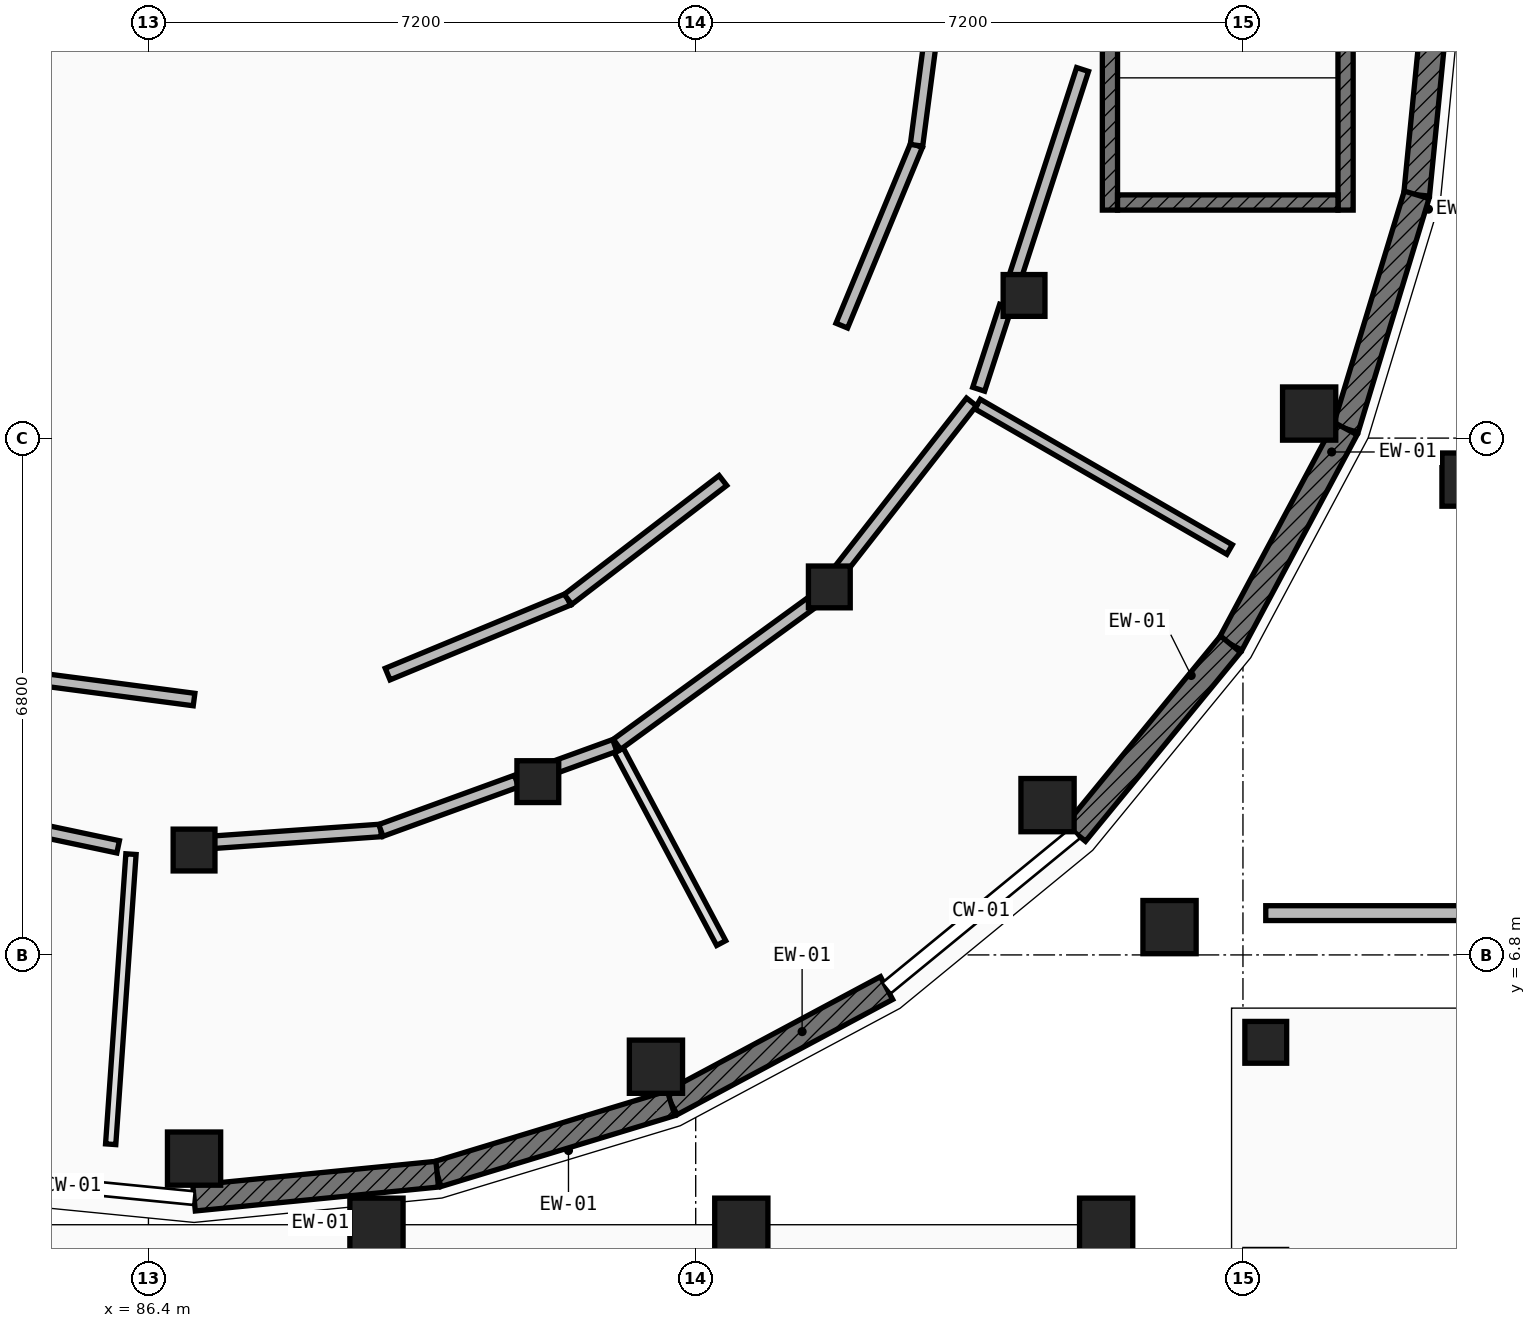
"""IFC4 building model, lengths in metres.
Left out: names, types, materials, properties, quantities, classifications, styles, units other than length and angle.
Written with IfcOpenShell. Run it as: python <this file> out.ifc"""

import sys

from ifc_helpers import new_model, si_unit, direction, frame, frame_2d, origin, origin_2d, place, context, subcontext, project, spatial, rectangle, circle, extrude, element, fill, save


model = new_model("IFC4")
c1 = context("Model", 3, precision=1e-05, world=origin(), true_north=direction((0.0, 1.0)))
c2 = subcontext(c1, "Body", "Model", "MODEL_VIEW")
j1 = project(units=[si_unit("LENGTHUNIT", "METRE"), si_unit("PLANEANGLEUNIT", "RADIAN")], contexts=[c1])
p1 = place(None, origin())
s1 = spatial("IfcSite", under=j1, at=p1, CompositionType="ELEMENT")
p2 = place(p1, origin())
s2 = spatial("IfcBuilding", under=s1, at=p2, CompositionType="ELEMENT")
p3 = place(p2, origin())
s3 = spatial("IfcBuildingStorey", under=s2, at=p3, CompositionType="ELEMENT", Elevation=0.0)
for number, where, z_axis, x_axis in (
    (1, (87.0, 4.12, 0.0), (0.0, 0.0, 1.0), (1.0, 0.0, 0.0)),
    (2, (93.077, 5.329, 0.0), (0.0, 0.0, 1.0), (1.0, 0.0, 0.0)),
    (3, (98.229, 8.771, 0.0), (0.0, 0.0, 1.0), (1.0, 0.0, 0.0)),
    (4, (101.671, 13.923, 0.0), (0.0, 0.0, 1.0), (1.0, 0.0, 0.0)),
):
    element("IfcColumn", number, at=place(p3, frame(where, z_axis=z_axis, x_axis=x_axis)), inside=s3, PredefinedType="COLUMN", context=c2, shape_type="SweptSolid", body=[
        extrude(circle(Radius=0.35, at=origin_2d()), origin(), (0.0, 0.0, 1.0), 4.55),
    ])
for number, where, z_axis, x_axis in (
    (5, (87.0, 8.18, 0.0), (0.0, 0.0, 1.0), (1.0, 0.0, 0.0)),
    (6, (91.523, 9.08, 0.0), (0.0, 0.0, 1.0), (1.0, 0.0, 0.0)),
    (7, (95.358, 11.642, 0.0), (0.0, 0.0, 1.0), (1.0, 0.0, 0.0)),
    (8, (97.92, 15.477, 0.0), (0.0, 0.0, 1.0), (1.0, 0.0, 0.0)),
):
    element("IfcColumn", number, at=place(p3, frame(where, z_axis=z_axis, x_axis=x_axis)), inside=s3, PredefinedType="COLUMN", context=c2, shape_type="SweptSolid", body=[
        extrude(rectangle(XDim=0.55, YDim=0.55, at=origin_2d()), origin(), (0.0, 0.0, 1.0), 4.55),
    ])
for number, where, z_axis, x_axis in (
    (9, (89.4, 3.25, 0.0), (0.0, 0.0, 1.0), (1.0, 0.0, 0.0)),
    (10, (94.2, 3.25, 0.0), (0.0, 0.0, 1.0), (1.0, 0.0, 0.0)),
    (11, (99.0, 3.25, 0.0), (0.0, 0.0, 1.0), (1.0, 0.0, 0.0)),
):
    element("IfcColumn", number, at=place(p3, frame(where, z_axis=z_axis, x_axis=x_axis)), inside=s3, PredefinedType="COLUMN", context=c2, shape_type="SweptSolid", body=[
        extrude(circle(Radius=0.35, at=origin_2d()), origin(), (0.0, 0.0, 1.0), 4.55),
    ])
p4 = place(p3, frame((101.1, 5.65, 0.0), z_axis=(0.0, 0.0, 1.0), x_axis=(1.0, 0.0, 0.0)))
e12 = element("IfcColumn", 12, at=p4, inside=s3, PredefinedType="PILASTER", context=c2, shape_type="SweptSolid", body=[
    extrude(circle(Radius=0.275, at=origin_2d()), origin(), (0.0, 0.0, 1.0), 4.55),
])
for number, where, z_axis, x_axis in (
    (13, (99.834, 7.166, 0.0), (0.0, 0.0, 1.0), (1.0, 0.0, 0.0)),
    (14, (103.768, 13.054, 0.0), (0.0, 0.0, 1.0), (1.0, 0.0, 0.0)),
):
    element("IfcColumn", number, at=place(p3, frame(where, z_axis=z_axis, x_axis=x_axis)), inside=s3, PredefinedType="COLUMN", context=c2, shape_type="SweptSolid", body=[
        extrude(circle(Radius=0.35, at=origin_2d()), origin(), (0.0, 0.0, 1.0), 4.55),
    ])
p5 = place(p3, frame((103.4, 20.0, 0.0), z_axis=(0.0, 0.0, 1.0), x_axis=(-0.097977057849, -0.995188673637, 0.0)))
e15 = element("IfcWall", 15, at=p5, inside=s3, PredefinedType="SOLIDWALL", context=c2, shape_type="SweptSolid", body=[
    extrude(rectangle(XDim=3.214, YDim=0.34, at=frame_2d((1.607, 0.0))), origin(), (0.0, 0.0, 1.0), 3.659),
])
p6 = place(p3, frame((103.085, 16.801, 0.0), z_axis=(0.0, 0.0, 1.0), x_axis=(-0.29014016356, -0.956984161567, 0.0)))
e16 = element("IfcWall", 16, at=p6, inside=s3, PredefinedType="SOLIDWALL", context=c2, shape_type="SweptSolid", body=[
    extrude(rectangle(XDim=3.215, YDim=0.34, at=frame_2d((1.607, 0.0))), origin(), (0.0, 0.0, 1.0), 3.659),
])
p7 = place(p6, frame((0.708, 0.0, 0.0)))
e17 = element("IfcOpeningElement", 17, at=p7, cuts=e16, PredefinedType="OPENING", context=c2, shape_type="SweptSolid", body=[
    extrude(rectangle(XDim=1.8, YDim=2.55, at=frame_2d((0.9, 1.275))), frame((0.0, 0.18, 0.0), z_axis=(0.0, -1.0, 0.0), x_axis=(1.0, 0.0, 0.0)), (0.0, 0.0, 1.0), 0.36),
])
for number, where, z_axis, x_axis in (
    (18, (102.152, 13.724, 0.0), (0.0, 0.0, 1.0), (-0.472, -0.882, 0.0)),
    (19, (100.636, 10.889, 0.0), (0.0, 0.0, 1.0), (-0.634, -0.773, 0.0)),
):
    element("IfcWall", number, at=place(p3, frame(where, z_axis=z_axis, x_axis=x_axis)), inside=s3, PredefinedType="SOLIDWALL", context=c2, shape_type="SweptSolid", body=[
        extrude(rectangle(XDim=3.215, YDim=0.34, at=frame_2d((1.607, 0.0))), origin(), (0.0, 0.0, 1.0), 3.659),
    ])
p8 = place(p3, frame((96.111, 6.364, 0.0), z_axis=(0.0, 0.0, 1.0), x_axis=(-0.881835313523, -0.47155750426, 0.0)))
e20 = element("IfcWall", 20, at=p8, inside=s3, PredefinedType="SOLIDWALL", context=c2, shape_type="SweptSolid", body=[
    extrude(rectangle(XDim=3.215, YDim=0.34, at=frame_2d((1.607, 0.0))), origin(), (0.0, 0.0, 1.0), 3.659),
])
p9 = place(p8, frame((0.782, 0.0, 0.0)))
e21 = element("IfcOpeningElement", 21, at=p9, cuts=e20, PredefinedType="OPENING", context=c2, shape_type="SweptSolid", body=[
    extrude(rectangle(XDim=1.65, YDim=2.45, at=frame_2d((0.825, 1.225))), frame((0.0, 0.18, 0.0), z_axis=(0.0, -1.0, 0.0), x_axis=(1.0, 0.0, 0.0)), (0.0, 0.0, 1.0), 0.36),
])
p10 = place(p3, frame((93.276, 4.848, 0.0), z_axis=(0.0, 0.0, 1.0), x_axis=(-0.956984161567, -0.29014016356, 0.0)))
e22 = element("IfcWall", 22, at=p10, inside=s3, PredefinedType="SOLIDWALL", context=c2, shape_type="SweptSolid", body=[
    extrude(rectangle(XDim=3.215, YDim=0.34, at=frame_2d((1.607, 0.0))), origin(), (0.0, 0.0, 1.0), 3.659),
])
p11 = place(p3, frame((90.199, 3.915, 0.0), z_axis=(0.0, 0.0, 1.0), x_axis=(-0.995188673637, -0.097977057849, 0.0)))
e23 = element("IfcWall", 23, at=p11, inside=s3, PredefinedType="SOLIDWALL", context=c2, shape_type="SweptSolid", body=[
    extrude(rectangle(XDim=3.214, YDim=0.34, at=frame_2d((1.607, 0.0))), origin(), (0.0, 0.0, 1.0), 3.659),
])
p12 = place(p3, frame((115.5, 7.35, 0.0), z_axis=(0.0, 0.0, 1.0), x_axis=(-1.0, 0.0, 0.0)))
e24 = element("IfcWall", 24, at=p12, inside=s3, PredefinedType="PARAPET", context=c2, shape_type="SweptSolid", body=[
    extrude(rectangle(XDim=14.4, YDim=0.195, at=frame_2d((7.2, 0.0))), origin(), (0.0, 0.0, 1.0), 2.37),
])
p13 = place(p12, frame((6.525, 0.0, 0.0)))
e25 = element("IfcOpeningElement", 25, at=p13, cuts=e24, PredefinedType="OPENING", context=c2, shape_type="SweptSolid", body=[
    extrude(rectangle(XDim=1.35, YDim=2.05, at=frame_2d((0.675, 1.025))), frame((0.0, 0.107, 0.0), z_axis=(0.0, -1.0, 0.0), x_axis=(1.0, 0.0, 0.0)), (0.0, 0.0, 1.0), 0.215),
])
p14 = place(p3, frame((99.05, 23.4, 0.0), z_axis=(0.0, 0.0, 1.0), x_axis=(0.0, -1.0, 0.0)))
e26 = element("IfcWall", 26, at=p14, inside=s3, PredefinedType="SHEAR", context=c2, shape_type="SweptSolid", body=[
    extrude(rectangle(XDim=6.8, YDim=0.2, at=frame_2d((3.4, 0.0))), origin(), (0.0, 0.0, 1.0), 4.305),
])
p15 = place(p14, frame((0.38, 0.0, 0.0)))
e27 = element("IfcOpeningElement", 27, at=p15, cuts=e26, PredefinedType="OPENING", context=c2, shape_type="SweptSolid", body=[
    extrude(rectangle(XDim=1.05, YDim=2.15, at=frame_2d((0.525, 1.075))), frame((0.0, 0.11, 0.0), z_axis=(0.0, -1.0, 0.0), x_axis=(1.0, 0.0, 0.0)), (0.0, 0.0, 1.0), 0.22),
])
p16 = place(p3, frame((102.15, 23.4, 0.0), z_axis=(0.0, 0.0, 1.0), x_axis=(0.0, -1.0, 0.0)))
e28 = element("IfcWall", 28, at=p16, inside=s3, PredefinedType="SHEAR", context=c2, shape_type="SweptSolid", body=[
    extrude(rectangle(XDim=6.8, YDim=0.2, at=frame_2d((3.4, 0.0))), origin(), (0.0, 0.0, 1.0), 4.305),
])
p17 = place(p3, frame((99.15, 16.7, 0.0), z_axis=(0.0, 0.0, 1.0), x_axis=(1.0, 0.0, 0.0)))
e29 = element("IfcWall", 29, at=p17, inside=s3, PredefinedType="SHEAR", context=c2, shape_type="SweptSolid", body=[
    extrude(rectangle(XDim=2.9, YDim=0.2, at=frame_2d((1.45, 0.0))), origin(), (0.0, 0.0, 1.0), 4.305),
])
p18 = place(p3, frame((84.453, 10.495, 0.0), z_axis=(0.0, 0.0, 1.0), x_axis=(0.991451384224, -0.130476636685, 0.0)))
e30 = element("IfcWall", 30, at=p18, inside=s3, PredefinedType="PARTITIONING", context=c2, shape_type="SweptSolid", body=[
    extrude(rectangle(XDim=2.569, YDim=0.165, at=frame_2d((1.285, 0.0))), origin(), (0.0, 0.0, 1.0), 3.634),
])
p19 = place(p3, frame((89.547, 10.495, 0.0), z_axis=(0.0, 0.0, 1.0), x_axis=(0.923870848353, 0.382704397106, 0.0)))
e31 = element("IfcWall", 31, at=p19, inside=s3, PredefinedType="PARTITIONING", context=c2, shape_type="SweptSolid", body=[
    extrude(rectangle(XDim=2.568, YDim=0.165, at=frame_2d((1.284, 0.0))), origin(), (0.0, 0.0, 1.0), 3.634),
])
p20 = place(p19, frame((0.509, 0.0, 0.0)))
e32 = element("IfcOpeningElement", 32, at=p20, cuts=e31, PredefinedType="OPENING", context=c2, shape_type="SweptSolid", body=[
    extrude(rectangle(XDim=1.55, YDim=2.35, at=frame_2d((0.775, 1.175))), frame((0.0, 0.093, 0.0), z_axis=(0.0, -1.0, 0.0), x_axis=(1.0, 0.0, 0.0)), (0.0, 0.0, 1.0), 0.185),
])
p21 = place(p3, frame((91.92, 11.478, 0.0), z_axis=(0.0, 0.0, 1.0), x_axis=(0.793337078322, 0.608782621434, 0.0)))
e33 = element("IfcWall", 33, at=p21, inside=s3, PredefinedType="PARTITIONING", context=c2, shape_type="SweptSolid", body=[
    extrude(rectangle(XDim=2.569, YDim=0.165, at=frame_2d((1.285, 0.0))), origin(), (0.0, 0.0, 1.0), 3.634),
])
p22 = place(p3, frame((95.522, 15.08, 0.0), z_axis=(0.0, 0.0, 1.0), x_axis=(0.382704397106, 0.923870848353, 0.0)))
e34 = element("IfcWall", 34, at=p22, inside=s3, PredefinedType="PARTITIONING", context=c2, shape_type="SweptSolid", body=[
    extrude(rectangle(XDim=2.568, YDim=0.165, at=frame_2d((1.284, 0.0))), origin(), (0.0, 0.0, 1.0), 3.634),
])
p23 = place(p3, frame((96.505, 17.453, 0.0), z_axis=(0.0, 0.0, 1.0), x_axis=(0.130476636685, 0.991451384224, 0.0)))
e35 = element("IfcWall", 35, at=p23, inside=s3, PredefinedType="PARTITIONING", context=c2, shape_type="SweptSolid", body=[
    extrude(rectangle(XDim=2.569, YDim=0.165, at=frame_2d((1.285, 0.0))), origin(), (0.0, 0.0, 1.0), 3.634),
])
p24 = place(p3, frame((86.17, 8.126, 0.0), z_axis=(0.0, 0.0, 1.0), x_axis=(-0.069741502562, -0.997565097034, 0.0)))
e36 = element("IfcWall", 36, at=p24, inside=s3, PredefinedType="PLUMBINGWALL", context=c2, shape_type="SweptSolid", body=[
    extrude(rectangle(XDim=3.826, YDim=0.135, at=frame_2d((1.913, 0.0))), origin(), (0.0, 0.0, 1.0), 3.634),
])
p25 = place(p3, frame((92.588, 9.49, 0.0), z_axis=(0.0, 0.0, 1.0), x_axis=(0.469430960331, -0.88296918037, 0.0)))
e37 = element("IfcWall", 37, at=p25, inside=s3, PredefinedType="PLUMBINGWALL", context=c2, shape_type="SweptSolid", body=[
    extrude(rectangle(XDim=2.87, YDim=0.135, at=frame_2d((1.435, 0.0))), origin(), (0.0, 0.0, 1.0), 3.634),
])
p26 = place(p3, frame((97.308, 14.048, 0.0), z_axis=(0.0, 0.0, 1.0), x_axis=(0.866068787954, -0.499924848885, 0.0)))
e38 = element("IfcWall", 38, at=p26, inside=s3, PredefinedType="PARTITIONING", context=c2, shape_type="SweptSolid", body=[
    extrude(rectangle(XDim=3.829, YDim=0.145, at=frame_2d((1.914, 0.0))), origin(), (0.0, 0.0, 1.0), 3.634),
])
p27 = place(p3, frame((83.152, 8.824, 0.0), z_axis=(0.0, 0.0, 1.0), x_axis=(0.978391146113, -0.206762581739, 0.0)))
e39 = element("IfcWall", 39, at=p27, inside=s3, PredefinedType="PARTITIONING", context=c2, shape_type="SweptSolid", body=[
    extrude(rectangle(XDim=2.912, YDim=0.165, at=frame_2d((1.456, 0.0))), origin(), (0.0, 0.0, 1.0), 3.634),
])
p28 = place(p3, frame((87.26, 8.283, 0.0), z_axis=(0.0, 0.0, 1.0), x_axis=(0.997521857639, 0.070357256426, 0.0)))
e40 = element("IfcWall", 40, at=p28, inside=s3, PredefinedType="PARTITIONING", context=c2, shape_type="SweptSolid", body=[
    extrude(rectangle(XDim=2.203, YDim=0.165, at=frame_2d((1.102, 0.0))), origin(), (0.0, 0.0, 1.0), 3.634),
])
p29 = place(p28, frame((0.651, 0.0, 0.0)))
e41 = element("IfcOpeningElement", 41, at=p29, cuts=e40, PredefinedType="OPENING", context=c2, shape_type="SweptSolid", body=[
    extrude(rectangle(XDim=0.9, YDim=2.1, at=frame_2d((0.45, 1.05))), frame((0.0, 0.093, 0.0), z_axis=(0.0, -1.0, 0.0), x_axis=(1.0, 0.0, 0.0)), (0.0, 0.0, 1.0), 0.185),
])
p30 = place(p3, frame((89.458, 8.438, 0.0), z_axis=(0.0, 0.0, 1.0), x_axis=(0.939815940842, 0.341681134011, 0.0)))
e42 = element("IfcWall", 42, at=p30, inside=s3, PredefinedType="PARTITIONING", context=c2, shape_type="SweptSolid", body=[
    extrude(rectangle(XDim=1.899, YDim=0.165, at=frame_2d((0.95, 0.0))), origin(), (0.0, 0.0, 1.0), 3.634),
])
p31 = place(p3, frame((91.733, 9.265, 0.0), z_axis=(0.0, 0.0, 1.0), x_axis=(0.94002714221, 0.341099650994, 0.0)))
e43 = element("IfcWall", 43, at=p31, inside=s3, PredefinedType="PARTITIONING", context=c2, shape_type="SweptSolid", body=[
    extrude(rectangle(XDim=0.853, YDim=0.165, at=frame_2d((0.427, 0.0))), origin(), (0.0, 0.0, 1.0), 3.634),
])
p32 = place(p3, frame((92.564, 9.571, 0.0), z_axis=(0.0, 0.0, 1.0), x_axis=(0.808488549055, 0.58851190816, 0.0)))
e44 = element("IfcWall", 44, at=p32, inside=s3, PredefinedType="PARTITIONING", context=c2, shape_type="SweptSolid", body=[
    extrude(rectangle(XDim=3.2, YDim=0.165, at=frame_2d((1.6, 0.0))), origin(), (0.0, 0.0, 1.0), 3.634),
])
p33 = place(p32, frame((1.13, 0.0, 0.0)))
e45 = element("IfcOpeningElement", 45, at=p33, cuts=e44, PredefinedType="OPENING", context=c2, shape_type="SweptSolid", body=[
    extrude(rectangle(XDim=0.94, YDim=2.1, at=frame_2d((0.47, 1.05))), frame((0.0, 0.093, 0.0), z_axis=(0.0, -1.0, 0.0), x_axis=(1.0, 0.0, 0.0)), (0.0, 0.0, 1.0), 0.185),
])
p34 = place(p3, frame((95.509, 11.878, 0.0), z_axis=(0.0, 0.0, 1.0), x_axis=(0.616046360546, 0.787709896889, 0.0)))
e46 = element("IfcWall", 46, at=p34, inside=s3, PredefinedType="PARTITIONING", context=c2, shape_type="SweptSolid", body=[
    extrude(rectangle(XDim=2.79, YDim=0.165, at=frame_2d((1.395, 0.0))), origin(), (0.0, 0.0, 1.0), 3.634),
])
p35 = place(p3, frame((97.323, 14.243, 0.0), z_axis=(0.0, 0.0, 1.0), x_axis=(0.308889116513, 0.951098056827, 0.0)))
e47 = element("IfcWall", 47, at=p35, inside=s3, PredefinedType="PARTITIONING", context=c2, shape_type="SweptSolid", body=[
    extrude(rectangle(XDim=1.149, YDim=0.165, at=frame_2d((0.575, 0.0))), origin(), (0.0, 0.0, 1.0), 3.634),
])
p36 = place(p3, frame((97.807, 15.733, 0.0), z_axis=(0.0, 0.0, 1.0), x_axis=(0.309091869187, 0.951032184735, 0.0)))
e48 = element("IfcWall", 48, at=p36, inside=s3, PredefinedType="PARTITIONING", context=c2, shape_type="SweptSolid", body=[
    extrude(rectangle(XDim=2.857, YDim=0.165, at=frame_2d((1.428, 0.0))), origin(), (0.0, 0.0, 1.0), 3.634),
])
p37 = place(p36, frame((0.968, 0.0, 0.0)))
e49 = element("IfcOpeningElement", 49, at=p37, cuts=e48, PredefinedType="OPENING", context=c2, shape_type="SweptSolid", body=[
    extrude(rectangle(XDim=0.92, YDim=2.24, at=frame_2d((0.46, 1.12))), frame((0.0, 0.093, 0.0), z_axis=(0.0, -1.0, 0.0), x_axis=(1.0, 0.0, 0.0)), (0.0, 0.0, 1.0), 0.185),
])
p38 = place(p7, origin())
e50 = element("IfcDoor", 50, at=p38, inside=s3, OperationType="SINGLE_SWING_LEFT", PredefinedType="DOOR", context=c2, shape_type="SweptSolid", body=[
    extrude(rectangle(XDim=1.8, YDim=2.55, at=frame_2d((0.9, 1.275))), frame((0.0, 0.025, 0.0), z_axis=(0.0, -1.0, 0.0), x_axis=(1.0, 0.0, 0.0)), (0.0, 0.0, 1.0), 0.05),
])
fill(e17, e50)
p39 = place(p9, origin())
e51 = element("IfcDoor", 51, at=p39, inside=s3, OperationType="SINGLE_SWING_RIGHT", PredefinedType="DOOR", context=c2, shape_type="SweptSolid", body=[
    extrude(rectangle(XDim=1.65, YDim=2.45, at=frame_2d((0.825, 1.225))), frame((0.0, 0.025, 0.0), z_axis=(0.0, -1.0, 0.0), x_axis=(1.0, 0.0, 0.0)), (0.0, 0.0, 1.0), 0.05),
])
fill(e21, e51)
p40 = place(p20, origin())
e52 = element("IfcDoor", 52, at=p40, inside=s3, OperationType="SINGLE_SWING_LEFT", PredefinedType="DOOR", context=c2, shape_type="SweptSolid", body=[
    extrude(rectangle(XDim=1.55, YDim=2.35, at=frame_2d((0.775, 1.175))), frame((0.0, 0.025, 0.0), z_axis=(0.0, -1.0, 0.0), x_axis=(1.0, 0.0, 0.0)), (0.0, 0.0, 1.0), 0.05),
])
fill(e32, e52)
p41 = place(p29, origin())
e53 = element("IfcDoor", 53, at=p41, inside=s3, OperationType="SINGLE_SWING_RIGHT", PredefinedType="DOOR", context=c2, shape_type="SweptSolid", body=[
    extrude(rectangle(XDim=0.9, YDim=2.1, at=frame_2d((0.45, 1.05))), frame((0.0, 0.025, 0.0), z_axis=(0.0, -1.0, 0.0), x_axis=(1.0, 0.0, 0.0)), (0.0, 0.0, 1.0), 0.05),
])
fill(e41, e53)
p42 = place(p33, origin())
e54 = element("IfcDoor", 54, at=p42, inside=s3, OperationType="SINGLE_SWING_LEFT", PredefinedType="DOOR", context=c2, shape_type="SweptSolid", body=[
    extrude(rectangle(XDim=0.94, YDim=2.1, at=frame_2d((0.47, 1.05))), frame((0.0, 0.025, 0.0), z_axis=(0.0, -1.0, 0.0), x_axis=(1.0, 0.0, 0.0)), (0.0, 0.0, 1.0), 0.05),
])
fill(e45, e54)
p43 = place(p37, origin())
e55 = element("IfcDoor", 55, at=p43, inside=s3, OperationType="SINGLE_SWING_RIGHT", PredefinedType="DOOR", context=c2, shape_type="SweptSolid", body=[
    extrude(rectangle(XDim=0.92, YDim=2.24, at=frame_2d((0.46, 1.12))), frame((0.0, 0.025, 0.0), z_axis=(0.0, -1.0, 0.0), x_axis=(1.0, 0.0, 0.0)), (0.0, 0.0, 1.0), 0.05),
])
fill(e49, e55)
save(model, sys.argv[1])
